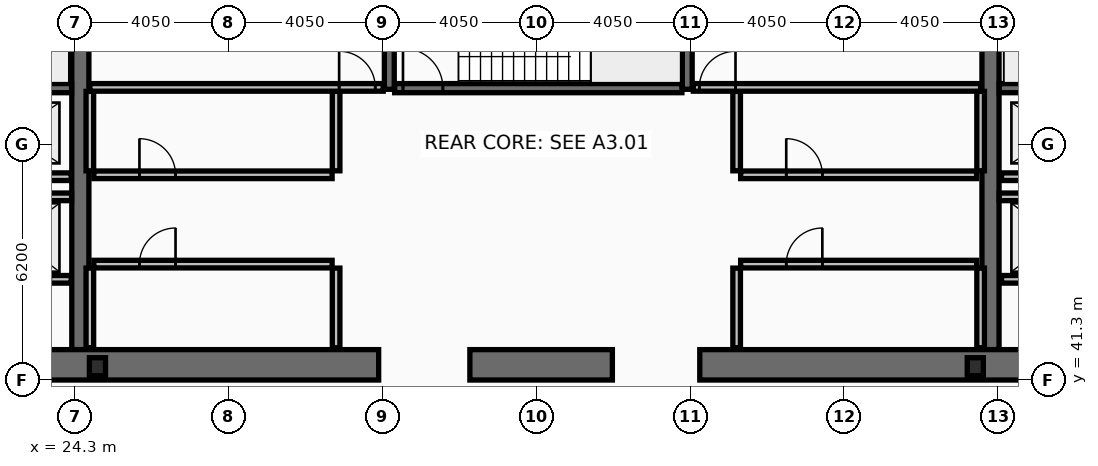
"""IFC4 building model, lengths in metres.
Left out: names, types, materials, properties, quantities, classifications, styles, units other than length and angle.
Written with IfcOpenShell. Run it as: python <this file> out.ifc"""

import sys

from ifc_helpers import new_model, si_unit, direction, frame, frame_2d, origin, origin_2d, place, context, subcontext, project, spatial, rectangle, i_section, extrude, element, fill, save


model = new_model("IFC4")
c1 = context("Model", 3, precision=1e-05, world=origin(), true_north=direction((0.0, 1.0)))
c2 = subcontext(c1, "Body", "Model", "MODEL_VIEW")
j1 = project(units=[si_unit("LENGTHUNIT", "METRE"), si_unit("PLANEANGLEUNIT", "RADIAN")], contexts=[c1])
p1 = place(None, origin())
s1 = spatial("IfcSite", under=j1, at=p1, CompositionType="ELEMENT")
p2 = place(p1, origin())
s2 = spatial("IfcBuilding", under=s1, at=p2, CompositionType="ELEMENT")
p3 = place(p2, frame((0.0, 0.0, -9.0)))
s3 = spatial("IfcBuildingStorey", under=s2, at=p3, CompositionType="ELEMENT", Elevation=-9.0)
for number, where, z_axis, x_axis in (
    (1, (24.45, 42.1, -0.2), (0.0, 0.0, 1.0), (0.0, 1.0, 0.0)),
    (2, (48.4, 42.1, -0.2), (0.0, 0.0, 1.0), (0.0, 1.0, 0.0)),
):
    element("IfcWall", number, at=place(p3, frame(where, z_axis=z_axis, x_axis=x_axis)), inside=s3, PredefinedType="SHEAR", context=c2, shape_type="SweptSolid", body=[
        extrude(rectangle(XDim=10.8, YDim=0.45, at=frame_2d((5.4, 0.0))), origin(), (0.0, 0.0, 1.0), 4.48),
    ])
p4 = place(p3, frame((32.3, 41.7, -0.2), z_axis=(0.0, 0.0, 1.0), x_axis=(-1.0, 0.0, 0.0)))
e3 = element("IfcWall", 3, at=p4, inside=s3, PredefinedType="SHEAR", context=c2, shape_type="SweptSolid", body=[
    extrude(rectangle(XDim=11.45, YDim=0.8, at=frame_2d((5.725, 0.0))), origin(), (0.0, 0.0, 1.0), 4.48),
])
p5 = place(p3, frame((38.45, 41.7, -0.2), z_axis=(0.0, 0.0, 1.0), x_axis=(-1.0, 0.0, 0.0)))
e4 = element("IfcWall", 4, at=p5, inside=s3, PredefinedType="SHEAR", context=c2, shape_type="SweptSolid", body=[
    extrude(rectangle(XDim=3.75, YDim=0.8, at=frame_2d((1.875, 0.0))), origin(), (0.0, 0.0, 1.0), 4.48),
])
p6 = place(p3, frame((52.05, 41.7, -0.2), z_axis=(0.0, 0.0, 1.0), x_axis=(-1.0, 0.0, 0.0)))
e5 = element("IfcWall", 5, at=p6, inside=s3, PredefinedType="SHEAR", context=c2, shape_type="SweptSolid", body=[
    extrude(rectangle(XDim=11.3, YDim=0.8, at=frame_2d((5.65, 0.0))), origin(), (0.0, 0.0, 1.0), 4.48),
])
for number, where, z_axis, x_axis in (
    (6, (32.58, 48.95, -0.2), (0.0, 0.0, 1.0), (0.0, 1.0, 0.0)),
    (7, (40.42, 48.95, -0.2), (0.0, 0.0, 1.0), (0.0, 1.0, 0.0)),
):
    element("IfcWall", number, at=place(p3, frame(where, z_axis=z_axis, x_axis=x_axis)), inside=s3, PredefinedType="SHEAR", context=c2, shape_type="SweptSolid", body=[
        extrude(rectangle(XDim=3.95, YDim=0.26, at=frame_2d((1.975, 0.0))), origin(), (0.0, 0.0, 1.0), 4.48),
    ])
p7 = place(p3, frame((17.0, 48.98, 0.0), z_axis=(0.0, 0.0, 1.0), x_axis=(1.0, 0.0, 0.0)))
e8 = element("IfcWall", 8, at=p7, inside=s3, PredefinedType="SHEAR", context=c2, shape_type="SweptSolid", body=[
    extrude(rectangle(XDim=7.22, YDim=0.24, at=frame_2d((3.61, 0.0))), origin(), (0.0, 0.0, 1.0), 4.28),
])
p8 = place(p7, frame((0.22, 0.0, 0.0)))
e9 = element("IfcOpeningElement", 9, at=p8, cuts=e8, PredefinedType="OPENING", context=c2, shape_type="SweptSolid", body=[
    extrude(rectangle(XDim=1.05, YDim=2.15, at=frame_2d((0.525, 1.075))), frame((0.0, 0.13, 0.0), z_axis=(0.0, -1.0, 0.0), x_axis=(1.0, 0.0, 0.0)), (0.0, 0.0, 1.0), 0.26),
])
p9 = place(p3, frame((48.63, 48.98, 0.0), z_axis=(0.0, 0.0, 1.0), x_axis=(1.0, 0.0, 0.0)))
e10 = element("IfcWall", 10, at=p9, inside=s3, PredefinedType="SHEAR", context=c2, shape_type="SweptSolid", body=[
    extrude(rectangle(XDim=7.27, YDim=0.24, at=frame_2d((3.635, 0.0))), origin(), (0.0, 0.0, 1.0), 4.28),
])
p10 = place(p9, frame((6.0, 0.0, 0.0)))
e11 = element("IfcOpeningElement", 11, at=p10, cuts=e10, PredefinedType="OPENING", context=c2, shape_type="SweptSolid", body=[
    extrude(rectangle(XDim=1.05, YDim=2.15, at=frame_2d((0.525, 1.075))), frame((0.0, 0.13, 0.0), z_axis=(0.0, -1.0, 0.0), x_axis=(1.0, 0.0, 0.0)), (0.0, 0.0, 1.0), 0.26),
])
p11 = place(p3, frame((32.72, 48.98, 0.0), z_axis=(0.0, 0.0, 1.0), x_axis=(1.0, 0.0, 0.0)))
e12 = element("IfcWall", 12, at=p11, inside=s3, PredefinedType="SHEAR", context=c2, shape_type="SweptSolid", body=[
    extrude(rectangle(XDim=7.56, YDim=0.24, at=frame_2d((3.78, 0.0))), origin(), (0.0, 0.0, 1.0), 4.28),
])
p12 = place(p11, frame((0.22, 0.0, 0.0)))
e13 = element("IfcOpeningElement", 13, at=p12, cuts=e12, PredefinedType="OPENING", context=c2, shape_type="SweptSolid", body=[
    extrude(rectangle(XDim=1.05, YDim=2.15, at=frame_2d((0.525, 1.075))), frame((0.0, 0.13, 0.0), z_axis=(0.0, -1.0, 0.0), x_axis=(1.0, 0.0, 0.0)), (0.0, 0.0, 1.0), 0.26),
])
for number, where, z_axis, x_axis in (
    (14, (24.9, 41.65, -0.2), (0.0, 0.0, 1.0), (1.0, 0.0, 0.0)),
    (15, (48.0, 41.65, -0.2), (0.0, 0.0, 1.0), (1.0, 0.0, 0.0)),
):
    element("IfcColumn", number, at=place(p3, frame(where, z_axis=z_axis, x_axis=x_axis)), inside=s3, PredefinedType="COLUMN", context=c2, shape_type="SweptSolid", body=[
        extrude(i_section(OverallWidth=0.424, OverallDepth=0.474, WebThickness=0.048, FlangeThickness=0.077, at=origin_2d()), origin(), (0.0, 0.0, 1.0), 4.7),
    ])
p13 = place(p3, frame((51.61, 43.95, 0.0), z_axis=(0.0, 0.0, 1.0), x_axis=(-1.0, 0.0, 0.0)))
e16 = element("IfcWall", 16, at=p13, inside=s3, PredefinedType="PARTITIONING", context=c2, shape_type="SweptSolid", body=[
    extrude(rectangle(XDim=2.92, YDim=0.2, at=frame_2d((1.46, 0.0))), origin(), (0.0, 0.0, 1.0), 4.28),
])
p14 = place(p13, frame((0.81, 0.0, 0.0)))
e17 = element("IfcOpeningElement", 17, at=p14, cuts=e16, PredefinedType="OPENING", context=c2, shape_type="SweptSolid", body=[
    extrude(rectangle(XDim=1.3, YDim=2.18, at=frame_2d((0.65, 1.09))), frame((0.0, 0.11, 0.0), z_axis=(0.0, -1.0, 0.0), x_axis=(1.0, 0.0, 0.0)), (0.0, 0.0, 1.0), 0.22),
])
p15 = place(p3, frame((24.21, 43.95, 0.0), z_axis=(0.0, 0.0, 1.0), x_axis=(-1.0, 0.0, 0.0)))
e18 = element("IfcWall", 18, at=p15, inside=s3, PredefinedType="PARTITIONING", context=c2, shape_type="SweptSolid", body=[
    extrude(rectangle(XDim=2.97, YDim=0.2, at=frame_2d((1.485, 0.0))), origin(), (0.0, 0.0, 1.0), 4.28),
])
p16 = place(p15, frame((0.86, 0.0, 0.0)))
e19 = element("IfcOpeningElement", 19, at=p16, cuts=e18, PredefinedType="OPENING", context=c2, shape_type="SweptSolid", body=[
    extrude(rectangle(XDim=1.3, YDim=2.18, at=frame_2d((0.65, 1.09))), frame((0.0, 0.11, 0.0), z_axis=(0.0, -1.0, 0.0), x_axis=(1.0, 0.0, 0.0)), (0.0, 0.0, 1.0), 0.22),
])
p17 = place(p3, frame((51.61, 46.65, 0.0), z_axis=(0.0, 0.0, 1.0), x_axis=(-1.0, 0.0, 0.0)))
e20 = element("IfcWall", 20, at=p17, inside=s3, PredefinedType="PARTITIONING", context=c2, shape_type="SweptSolid", body=[
    extrude(rectangle(XDim=2.92, YDim=0.2, at=frame_2d((1.46, 0.0))), origin(), (0.0, 0.0, 1.0), 4.28),
])
p18 = place(p17, frame((0.86, 0.0, 0.0)))
e21 = element("IfcOpeningElement", 21, at=p18, cuts=e20, PredefinedType="OPENING", context=c2, shape_type="SweptSolid", body=[
    extrude(rectangle(XDim=1.2, YDim=2.18, at=frame_2d((0.6, 1.09))), frame((0.0, 0.11, 0.0), z_axis=(0.0, -1.0, 0.0), x_axis=(1.0, 0.0, 0.0)), (0.0, 0.0, 1.0), 0.22),
])
p19 = place(p3, frame((24.21, 46.65, 0.0), z_axis=(0.0, 0.0, 1.0), x_axis=(-1.0, 0.0, 0.0)))
e22 = element("IfcWall", 22, at=p19, inside=s3, PredefinedType="PARTITIONING", context=c2, shape_type="SweptSolid", body=[
    extrude(rectangle(XDim=2.97, YDim=0.2, at=frame_2d((1.485, 0.0))), origin(), (0.0, 0.0, 1.0), 4.28),
])
p20 = place(p19, frame((0.91, 0.0, 0.0)))
e23 = element("IfcOpeningElement", 23, at=p20, cuts=e22, PredefinedType="OPENING", context=c2, shape_type="SweptSolid", body=[
    extrude(rectangle(XDim=1.2, YDim=2.18, at=frame_2d((0.6, 1.09))), frame((0.0, 0.11, 0.0), z_axis=(0.0, -1.0, 0.0), x_axis=(1.0, 0.0, 0.0)), (0.0, 0.0, 1.0), 0.22),
])
p21 = place(p3, frame((21.2, 46.12, 0.0), z_axis=(0.0, 0.0, 1.0), x_axis=(1.0, 0.0, 0.0)))
e24 = element("IfcWall", 24, at=p21, inside=s3, PredefinedType="PARTITIONING", context=c2, shape_type="SweptSolid", body=[
    extrude(rectangle(XDim=3.02, YDim=0.2, at=frame_2d((1.51, 0.0))), origin(), (0.0, 0.0, 1.0), 4.28),
])
p22 = place(p3, frame((48.63, 46.12, 0.0), z_axis=(0.0, 0.0, 1.0), x_axis=(1.0, 0.0, 0.0)))
e25 = element("IfcWall", 25, at=p22, inside=s3, PredefinedType="PARTITIONING", context=c2, shape_type="SweptSolid", body=[
    extrude(rectangle(XDim=3.07, YDim=0.2, at=frame_2d((1.535, 0.0))), origin(), (0.0, 0.0, 1.0), 4.28),
])
for number, where, z_axis, x_axis in (
    (26, (24.7, 46.805, 0.0), (0.0, 0.0, 1.0), (0.0, 1.0, 0.0)),
    (27, (31.18, 46.805, 0.0), (0.0, 0.0, 1.0), (0.0, 1.0, 0.0)),
):
    element("IfcWall", number, at=place(p3, frame(where, z_axis=z_axis, x_axis=x_axis)), inside=s3, PredefinedType="PARTITIONING", context=c2, shape_type="SweptSolid", body=[
        extrude(rectangle(XDim=2.09, YDim=0.2, at=frame_2d((1.045, 0.0))), origin(), (0.0, 0.0, 1.0), 4.28),
    ])
p23 = place(p3, frame((24.805, 46.7, 0.0), z_axis=(0.0, 0.0, 1.0), x_axis=(1.0, 0.0, 0.0)))
e28 = element("IfcWall", 28, at=p23, inside=s3, PredefinedType="PARTITIONING", context=c2, shape_type="SweptSolid", body=[
    extrude(rectangle(XDim=6.27, YDim=0.2, at=frame_2d((3.135, 0.0))), origin(), (0.0, 0.0, 1.0), 4.28),
])
p24 = place(p23, frame((1.2, 0.0, 0.0)))
e29 = element("IfcOpeningElement", 29, at=p24, cuts=e28, PredefinedType="OPENING", context=c2, shape_type="SweptSolid", body=[
    extrude(rectangle(XDim=0.95, YDim=2.1, at=frame_2d((0.475, 1.05))), frame((0.0, 0.11, 0.0), z_axis=(0.0, -1.0, 0.0), x_axis=(1.0, 0.0, 0.0)), (0.0, 0.0, 1.0), 0.22),
])
for number, where, z_axis, x_axis in (
    (30, (24.7, 42.15, 0.0), (0.0, 0.0, 1.0), (0.0, 1.0, 0.0)),
    (31, (31.18, 42.15, 0.0), (0.0, 0.0, 1.0), (0.0, 1.0, 0.0)),
):
    element("IfcWall", number, at=place(p3, frame(where, z_axis=z_axis, x_axis=x_axis)), inside=s3, PredefinedType="PARTITIONING", context=c2, shape_type="SweptSolid", body=[
        extrude(rectangle(XDim=2.095, YDim=0.2, at=frame_2d((1.048, 0.0))), origin(), (0.0, 0.0, 1.0), 4.28),
    ])
p25 = place(p3, frame((24.805, 44.35, 0.0), z_axis=(0.0, 0.0, 1.0), x_axis=(1.0, 0.0, 0.0)))
e32 = element("IfcWall", 32, at=p25, inside=s3, PredefinedType="PARTITIONING", context=c2, shape_type="SweptSolid", body=[
    extrude(rectangle(XDim=6.27, YDim=0.2, at=frame_2d((3.135, 0.0))), origin(), (0.0, 0.0, 1.0), 4.28),
])
p26 = place(p25, frame((1.2, 0.0, 0.0)))
e33 = element("IfcOpeningElement", 33, at=p26, cuts=e32, PredefinedType="OPENING", context=c2, shape_type="SweptSolid", body=[
    extrude(rectangle(XDim=0.95, YDim=2.1, at=frame_2d((0.475, 1.05))), frame((0.0, 0.11, 0.0), z_axis=(0.0, -1.0, 0.0), x_axis=(1.0, 0.0, 0.0)), (0.0, 0.0, 1.0), 0.22),
])
for number, where, z_axis, x_axis in (
    (34, (41.72, 46.805, 0.0), (0.0, 0.0, 1.0), (0.0, 1.0, 0.0)),
    (35, (48.14, 46.805, 0.0), (0.0, 0.0, 1.0), (0.0, 1.0, 0.0)),
):
    element("IfcWall", number, at=place(p3, frame(where, z_axis=z_axis, x_axis=x_axis)), inside=s3, PredefinedType="PARTITIONING", context=c2, shape_type="SweptSolid", body=[
        extrude(rectangle(XDim=2.09, YDim=0.2, at=frame_2d((1.045, 0.0))), origin(), (0.0, 0.0, 1.0), 4.28),
    ])
p27 = place(p3, frame((41.825, 46.7, 0.0), z_axis=(0.0, 0.0, 1.0), x_axis=(1.0, 0.0, 0.0)))
e36 = element("IfcWall", 36, at=p27, inside=s3, PredefinedType="PARTITIONING", context=c2, shape_type="SweptSolid", body=[
    extrude(rectangle(XDim=6.21, YDim=0.2, at=frame_2d((3.105, 0.0))), origin(), (0.0, 0.0, 1.0), 4.28),
])
p28 = place(p27, frame((1.2, 0.0, 0.0)))
e37 = element("IfcOpeningElement", 37, at=p28, cuts=e36, PredefinedType="OPENING", context=c2, shape_type="SweptSolid", body=[
    extrude(rectangle(XDim=0.95, YDim=2.1, at=frame_2d((0.475, 1.05))), frame((0.0, 0.11, 0.0), z_axis=(0.0, -1.0, 0.0), x_axis=(1.0, 0.0, 0.0)), (0.0, 0.0, 1.0), 0.22),
])
for number, where, z_axis, x_axis in (
    (38, (41.72, 42.15, 0.0), (0.0, 0.0, 1.0), (0.0, 1.0, 0.0)),
    (39, (48.14, 42.15, 0.0), (0.0, 0.0, 1.0), (0.0, 1.0, 0.0)),
):
    element("IfcWall", number, at=place(p3, frame(where, z_axis=z_axis, x_axis=x_axis)), inside=s3, PredefinedType="PARTITIONING", context=c2, shape_type="SweptSolid", body=[
        extrude(rectangle(XDim=2.095, YDim=0.2, at=frame_2d((1.048, 0.0))), origin(), (0.0, 0.0, 1.0), 4.28),
    ])
p29 = place(p3, frame((41.825, 44.35, 0.0), z_axis=(0.0, 0.0, 1.0), x_axis=(1.0, 0.0, 0.0)))
e40 = element("IfcWall", 40, at=p29, inside=s3, PredefinedType="PARTITIONING", context=c2, shape_type="SweptSolid", body=[
    extrude(rectangle(XDim=6.21, YDim=0.2, at=frame_2d((3.105, 0.0))), origin(), (0.0, 0.0, 1.0), 4.28),
])
p30 = place(p29, frame((1.2, 0.0, 0.0)))
e41 = element("IfcOpeningElement", 41, at=p30, cuts=e40, PredefinedType="OPENING", context=c2, shape_type="SweptSolid", body=[
    extrude(rectangle(XDim=0.95, YDim=2.1, at=frame_2d((0.475, 1.05))), frame((0.0, 0.11, 0.0), z_axis=(0.0, -1.0, 0.0), x_axis=(1.0, 0.0, 0.0)), (0.0, 0.0, 1.0), 0.22),
])
p31 = place(p3, frame((24.7, 49.0, 0.0), z_axis=(0.0, 0.0, 1.0), x_axis=(1.0, 0.0, 0.0)))
e42 = element("IfcWall", 42, at=p31, inside=s3, PredefinedType="PARTITIONING", context=c2, shape_type="SweptSolid", body=[
    extrude(rectangle(XDim=7.72, YDim=0.2, at=frame_2d((3.86, 0.0))), origin(), (0.0, 0.0, 1.0), 4.28),
])
p32 = place(p31, frame((6.56, 0.0, 0.0)))
e43 = element("IfcOpeningElement", 43, at=p32, cuts=e42, PredefinedType="OPENING", context=c2, shape_type="SweptSolid", body=[
    extrude(rectangle(XDim=0.95, YDim=2.1, at=frame_2d((0.475, 1.05))), frame((0.0, 0.11, 0.0), z_axis=(0.0, -1.0, 0.0), x_axis=(1.0, 0.0, 0.0)), (0.0, 0.0, 1.0), 0.22),
])
p33 = place(p3, frame((40.58, 49.0, 0.0), z_axis=(0.0, 0.0, 1.0), x_axis=(1.0, 0.0, 0.0)))
e44 = element("IfcWall", 44, at=p33, inside=s3, PredefinedType="PARTITIONING", context=c2, shape_type="SweptSolid", body=[
    extrude(rectangle(XDim=7.56, YDim=0.2, at=frame_2d((3.78, 0.0))), origin(), (0.0, 0.0, 1.0), 4.28),
])
p34 = place(p33, frame((0.16, 0.0, 0.0)))
e45 = element("IfcOpeningElement", 45, at=p34, cuts=e44, PredefinedType="OPENING", context=c2, shape_type="SweptSolid", body=[
    extrude(rectangle(XDim=0.95, YDim=2.1, at=frame_2d((0.475, 1.05))), frame((0.0, 0.11, 0.0), z_axis=(0.0, -1.0, 0.0), x_axis=(1.0, 0.0, 0.0)), (0.0, 0.0, 1.0), 0.22),
])
p35 = place(p12, origin())
e46 = element("IfcDoor", 46, at=p35, inside=s3, OperationType="SINGLE_SWING_LEFT", PredefinedType="DOOR", context=c2, shape_type="SweptSolid", body=[
    extrude(rectangle(XDim=1.05, YDim=2.15, at=frame_2d((0.525, 1.075))), frame((0.0, 0.025, 0.0), z_axis=(0.0, -1.0, 0.0), x_axis=(1.0, 0.0, 0.0)), (0.0, 0.0, 1.0), 0.05),
])
fill(e13, e46)
p36 = place(p24, origin())
e47 = element("IfcDoor", 47, at=p36, inside=s3, OperationType="SINGLE_SWING_LEFT", PredefinedType="DOOR", context=c2, shape_type="SweptSolid", body=[
    extrude(rectangle(XDim=0.95, YDim=2.1, at=frame_2d((0.475, 1.05))), frame((0.0, 0.025, 0.0), z_axis=(0.0, -1.0, 0.0), x_axis=(1.0, 0.0, 0.0)), (0.0, 0.0, 1.0), 0.05),
])
fill(e29, e47)
p37 = place(p26, origin())
e48 = element("IfcDoor", 48, at=p37, inside=s3, OperationType="SINGLE_SWING_RIGHT", PredefinedType="DOOR", context=c2, shape_type="SweptSolid", body=[
    extrude(rectangle(XDim=0.95, YDim=2.1, at=frame_2d((0.475, 1.05))), frame((0.0, 0.025, 0.0), z_axis=(0.0, -1.0, 0.0), x_axis=(1.0, 0.0, 0.0)), (0.0, 0.0, 1.0), 0.05),
])
fill(e33, e48)
p38 = place(p28, origin())
e49 = element("IfcDoor", 49, at=p38, inside=s3, OperationType="SINGLE_SWING_LEFT", PredefinedType="DOOR", context=c2, shape_type="SweptSolid", body=[
    extrude(rectangle(XDim=0.95, YDim=2.1, at=frame_2d((0.475, 1.05))), frame((0.0, 0.025, 0.0), z_axis=(0.0, -1.0, 0.0), x_axis=(1.0, 0.0, 0.0)), (0.0, 0.0, 1.0), 0.05),
])
fill(e37, e49)
p39 = place(p30, origin())
e50 = element("IfcDoor", 50, at=p39, inside=s3, OperationType="SINGLE_SWING_RIGHT", PredefinedType="DOOR", context=c2, shape_type="SweptSolid", body=[
    extrude(rectangle(XDim=0.95, YDim=2.1, at=frame_2d((0.475, 1.05))), frame((0.0, 0.025, 0.0), z_axis=(0.0, -1.0, 0.0), x_axis=(1.0, 0.0, 0.0)), (0.0, 0.0, 1.0), 0.05),
])
fill(e41, e50)
p40 = place(p32, origin())
e51 = element("IfcDoor", 51, at=p40, inside=s3, OperationType="SINGLE_SWING_LEFT", PredefinedType="DOOR", context=c2, shape_type="SweptSolid", body=[
    extrude(rectangle(XDim=0.95, YDim=2.1, at=frame_2d((0.475, 1.05))), frame((0.0, 0.025, 0.0), z_axis=(0.0, -1.0, 0.0), x_axis=(1.0, 0.0, 0.0)), (0.0, 0.0, 1.0), 0.05),
])
fill(e43, e51)
p41 = place(p34, origin())
e52 = element("IfcDoor", 52, at=p41, inside=s3, OperationType="SINGLE_SWING_RIGHT", PredefinedType="DOOR", context=c2, shape_type="SweptSolid", body=[
    extrude(rectangle(XDim=0.95, YDim=2.1, at=frame_2d((0.475, 1.05))), frame((0.0, 0.025, 0.0), z_axis=(0.0, -1.0, 0.0), x_axis=(1.0, 0.0, 0.0)), (0.0, 0.0, 1.0), 0.05),
])
fill(e45, e52)
save(model, sys.argv[1])
